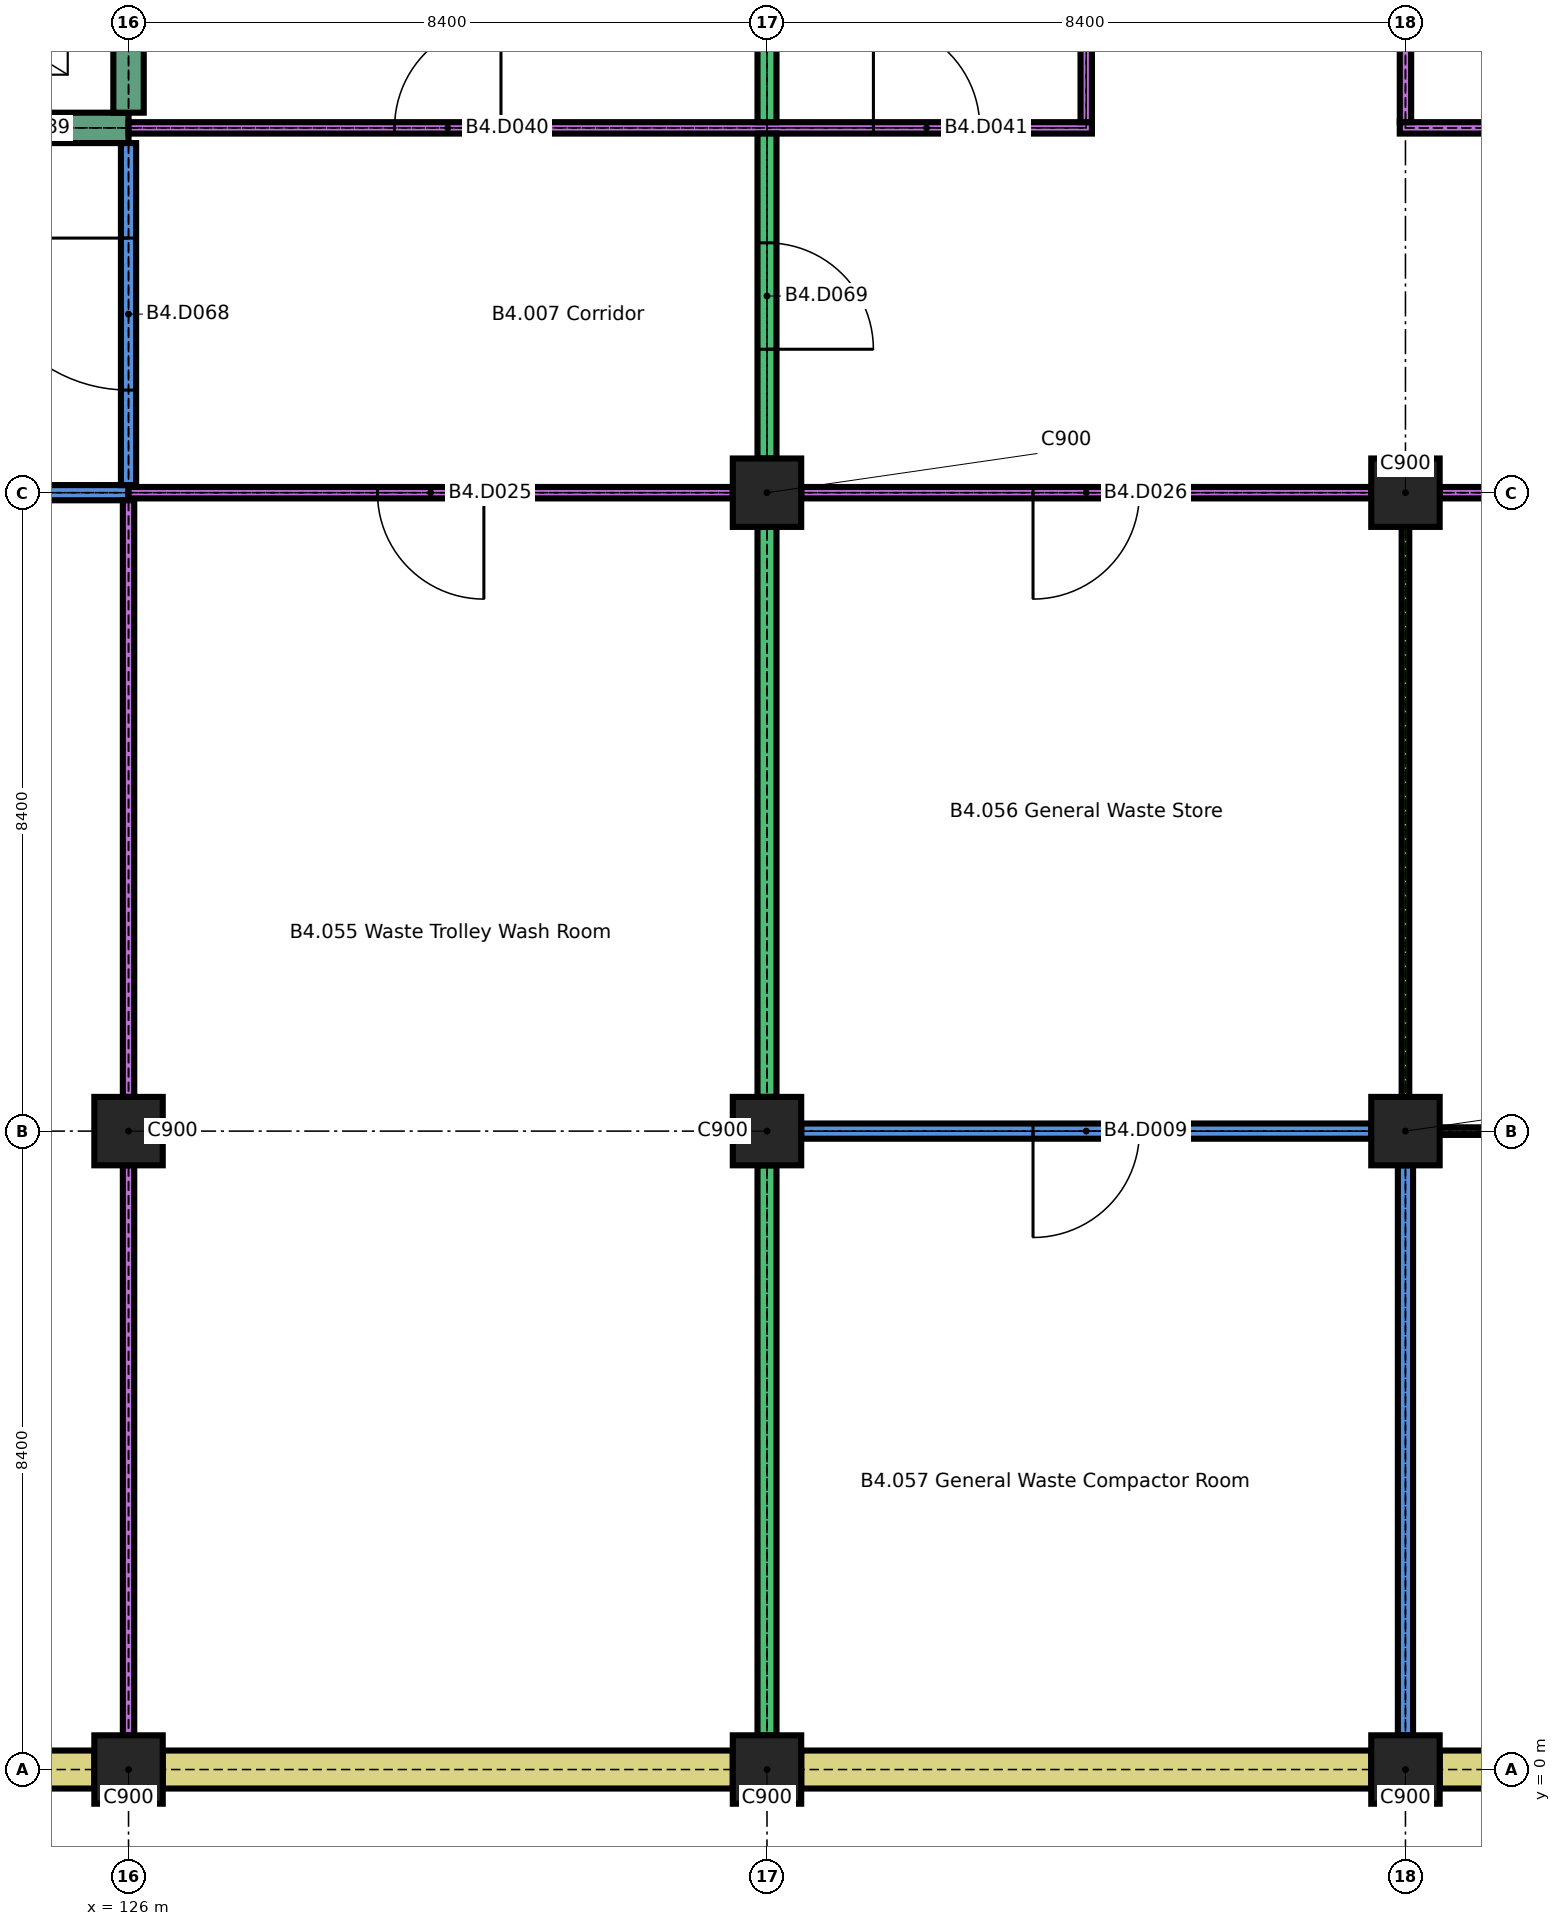
"""IFC4 building model, lengths in metres.
Left out: names, types, materials, properties, quantities, classifications, styles, units other than length and angle.
Written with IfcOpenShell. Run it as: python <this file> out.ifc"""

import sys

from ifc_helpers import new_model, si_unit, direction, frame, frame_2d, origin, origin_2d, place, context, subcontext, project, spatial, rectangle, extrude, element, fill, save


model = new_model("IFC4")
c1 = context("Model", 3, precision=1e-05, world=origin(), true_north=direction((0.0, 1.0)))
c2 = subcontext(c1, "Body", "Model", "MODEL_VIEW")
j1 = project(units=[si_unit("LENGTHUNIT", "METRE"), si_unit("PLANEANGLEUNIT", "RADIAN")], contexts=[c1])
p1 = place(None, origin())
s1 = spatial("IfcSite", under=j1, at=p1, CompositionType="ELEMENT")
p2 = place(p1, origin())
s2 = spatial("IfcBuilding", under=s1, at=p2, CompositionType="ELEMENT")
p3 = place(p2, frame((0.0, 0.0, -15.0)))
s3 = spatial("IfcBuildingStorey", under=s2, at=p3, CompositionType="ELEMENT", Elevation=-15.0)
for number, where, z_axis, x_axis in (
    (1, (126.0, 0.0, 0.0), (0.0, 0.0, 1.0), (1.0, 0.0, 0.0)),
    (2, (134.4, 0.0, 0.0), (0.0, 0.0, 1.0), (1.0, 0.0, 0.0)),
    (3, (142.8, 0.0, 0.0), (0.0, 0.0, 1.0), (1.0, 0.0, 0.0)),
    (4, (126.0, 8.4, 0.0), (0.0, 0.0, 1.0), (1.0, 0.0, 0.0)),
    (5, (134.4, 8.4, 0.0), (0.0, 0.0, 1.0), (1.0, 0.0, 0.0)),
    (6, (142.8, 8.4, 0.0), (0.0, 0.0, 1.0), (1.0, 0.0, 0.0)),
    (7, (134.4, 16.8, 0.0), (0.0, 0.0, 1.0), (1.0, 0.0, 0.0)),
    (8, (142.8, 16.8, 0.0), (0.0, 0.0, 1.0), (1.0, 0.0, 0.0)),
):
    element("IfcColumn", number, at=place(p3, frame(where, z_axis=z_axis, x_axis=x_axis)), inside=s3, PredefinedType="COLUMN", context=c2, shape_type="SweptSolid", body=[
        extrude(rectangle(XDim=0.9, YDim=0.9, at=origin_2d()), origin(), (0.0, 0.0, 1.0), 3.2),
    ])
for number, where, z_axis, x_axis in (
    (9, (118.05, 0.0, 0.0), (0.0, 0.0, 1.0), (1.0, 0.0, 0.0)),
    (10, (126.45, 0.0, 0.0), (0.0, 0.0, 1.0), (1.0, 0.0, 0.0)),
    (11, (134.85, 0.0, 0.0), (0.0, 0.0, 1.0), (1.0, 0.0, 0.0)),
    (12, (143.25, 0.0, 0.0), (0.0, 0.0, 1.0), (1.0, 0.0, 0.0)),
):
    element("IfcWall", number, at=place(p3, frame(where, z_axis=z_axis, x_axis=x_axis)), inside=s3, PredefinedType="SOLIDWALL", context=c2, shape_type="SweptSolid", body=[
        extrude(rectangle(XDim=7.5, YDim=0.5, at=frame_2d((3.75, 0.0))), origin(), (0.0, 0.0, 1.0), 3.2),
    ])
p4 = place(p3, frame((134.85, 8.4, 0.0), z_axis=(0.0, 0.0, 1.0), x_axis=(1.0, 0.0, 0.0)))
e13 = element("IfcWall", 13, at=p4, inside=s3, PredefinedType="PARTITIONING", context=c2, shape_type="SweptSolid", body=[
    extrude(rectangle(XDim=7.5, YDim=0.2, at=frame_2d((3.75, 0.0))), origin(), (0.0, 0.0, 1.0), 3.2),
])
p5 = place(p4, frame((3.05, 0.0, 0.0)))
e14 = element("IfcOpeningElement", 14, at=p5, cuts=e13, PredefinedType="OPENING", context=c2, shape_type="SweptSolid", body=[
    extrude(rectangle(XDim=1.4, YDim=2.1, at=frame_2d((0.7, 1.05))), frame((0.0, 0.11, 0.0), z_axis=(0.0, -1.0, 0.0), x_axis=(1.0, 0.0, 0.0)), (0.0, 0.0, 1.0), 0.22),
])
p6 = place(p3, frame((143.25, 8.4, 0.0), z_axis=(0.0, 0.0, 1.0), x_axis=(1.0, 0.0, 0.0)))
e15 = element("IfcWall", 15, at=p6, inside=s3, PredefinedType="PARTITIONING", context=c2, shape_type="SweptSolid", body=[
    extrude(rectangle(XDim=7.5, YDim=0.1, at=frame_2d((3.75, 0.0))), origin(), (0.0, 0.0, 1.0), 3.2),
])
p7 = place(p6, frame((3.05, 0.0, 0.0)))
e16 = element("IfcOpeningElement", 16, at=p7, cuts=e15, PredefinedType="OPENING", context=c2, shape_type="SweptSolid", body=[
    extrude(rectangle(XDim=1.4, YDim=2.1, at=frame_2d((0.7, 1.05))), frame((0.0, 0.06, 0.0), z_axis=(0.0, -1.0, 0.0), x_axis=(1.0, 0.0, 0.0)), (0.0, 0.0, 1.0), 0.12),
])
p8 = place(p3, frame((109.65, 16.8, 0.0), z_axis=(0.0, 0.0, 1.0), x_axis=(1.0, 0.0, 0.0)))
e17 = element("IfcWall", 17, at=p8, inside=s3, PredefinedType="PARTITIONING", context=c2, shape_type="SweptSolid", body=[
    extrude(rectangle(XDim=16.35, YDim=0.2, at=frame_2d((8.175, 0.0))), origin(), (0.0, 0.0, 1.0), 3.2),
])
p9 = place(p8, frame((3.275, 0.0, 0.0)))
e18 = element("IfcOpeningElement", 18, at=p9, cuts=e17, PredefinedType="OPENING", context=c2, shape_type="SweptSolid", body=[
    extrude(rectangle(XDim=1.4, YDim=2.1, at=frame_2d((0.7, 1.05))), frame((0.0, 0.11, 0.0), z_axis=(0.0, -1.0, 0.0), x_axis=(1.0, 0.0, 0.0)), (0.0, 0.0, 1.0), 0.22),
])
p10 = place(p3, frame((126.0, 16.8, 0.0), z_axis=(0.0, 0.0, 1.0), x_axis=(1.0, 0.0, 0.0)))
e19 = element("IfcWall", 19, at=p10, inside=s3, PredefinedType="PARTITIONING", context=c2, shape_type="SweptSolid", body=[
    extrude(rectangle(XDim=7.95, YDim=0.15, at=frame_2d((3.975, 0.0))), origin(), (0.0, 0.0, 1.0), 3.2),
])
p11 = place(p10, frame((3.275, 0.0, 0.0)))
e20 = element("IfcOpeningElement", 20, at=p11, cuts=e19, PredefinedType="OPENING", context=c2, shape_type="SweptSolid", body=[
    extrude(rectangle(XDim=1.4, YDim=2.1, at=frame_2d((0.7, 1.05))), frame((0.0, 0.085, 0.0), z_axis=(0.0, -1.0, 0.0), x_axis=(1.0, 0.0, 0.0)), (0.0, 0.0, 1.0), 0.17),
])
p12 = place(p3, frame((134.85, 16.8, 0.0), z_axis=(0.0, 0.0, 1.0), x_axis=(1.0, 0.0, 0.0)))
e21 = element("IfcWall", 21, at=p12, inside=s3, PredefinedType="PARTITIONING", context=c2, shape_type="SweptSolid", body=[
    extrude(rectangle(XDim=7.5, YDim=0.15, at=frame_2d((3.75, 0.0))), origin(), (0.0, 0.0, 1.0), 3.2),
])
p13 = place(p12, frame((3.05, 0.0, 0.0)))
e22 = element("IfcOpeningElement", 22, at=p13, cuts=e21, PredefinedType="OPENING", context=c2, shape_type="SweptSolid", body=[
    extrude(rectangle(XDim=1.4, YDim=2.1, at=frame_2d((0.7, 1.05))), frame((0.0, 0.085, 0.0), z_axis=(0.0, -1.0, 0.0), x_axis=(1.0, 0.0, 0.0)), (0.0, 0.0, 1.0), 0.17),
])
p14 = place(p3, frame((143.25, 16.8, 0.0), z_axis=(0.0, 0.0, 1.0), x_axis=(1.0, 0.0, 0.0)))
e23 = element("IfcWall", 23, at=p14, inside=s3, PredefinedType="PARTITIONING", context=c2, shape_type="SweptSolid", body=[
    extrude(rectangle(XDim=7.5, YDim=0.15, at=frame_2d((3.75, 0.0))), origin(), (0.0, 0.0, 1.0), 3.2),
])
p15 = place(p14, frame((3.05, 0.0, 0.0)))
e24 = element("IfcOpeningElement", 24, at=p15, cuts=e23, PredefinedType="OPENING", context=c2, shape_type="SweptSolid", body=[
    extrude(rectangle(XDim=1.4, YDim=2.1, at=frame_2d((0.7, 1.05))), frame((0.0, 0.085, 0.0), z_axis=(0.0, -1.0, 0.0), x_axis=(1.0, 0.0, 0.0)), (0.0, 0.0, 1.0), 0.17),
])
p16 = place(p3, frame((117.8, 21.6, 0.0), z_axis=(0.0, 0.0, 1.0), x_axis=(1.0, 0.0, 0.0)))
e25 = element("IfcWall", 25, at=p16, inside=s3, PredefinedType="SHEAR", context=c2, shape_type="SweptSolid", body=[
    extrude(rectangle(XDim=8.2, YDim=0.4, at=frame_2d((4.1, 0.0))), origin(), (0.0, 0.0, 1.0), 3.2),
])
p17 = place(p16, frame((1.45, 0.0, 0.0)))
e26 = element("IfcOpeningElement", 26, at=p17, cuts=e25, PredefinedType="OPENING", context=c2, shape_type="SweptSolid", body=[
    extrude(rectangle(XDim=1.1, YDim=2.1, at=frame_2d((0.55, 1.05))), frame((0.0, 0.21, 0.0), z_axis=(0.0, -1.0, 0.0), x_axis=(1.0, 0.0, 0.0)), (0.0, 0.0, 1.0), 0.42),
])
p18 = place(p16, frame((5.55, 0.0, 0.0)))
e27 = element("IfcOpeningElement", 27, at=p18, cuts=e25, PredefinedType="OPENING", context=c2, shape_type="SweptSolid", body=[
    extrude(rectangle(XDim=1.1, YDim=2.1, at=frame_2d((0.55, 1.05))), frame((0.0, 0.21, 0.0), z_axis=(0.0, -1.0, 0.0), x_axis=(1.0, 0.0, 0.0)), (0.0, 0.0, 1.0), 0.42),
])
p19 = place(p3, frame((126.0, 21.6, 0.0), z_axis=(0.0, 0.0, 1.0), x_axis=(1.0, 0.0, 0.0)))
e28 = element("IfcWall", 28, at=p19, inside=s3, PredefinedType="PARTITIONING", context=c2, shape_type="SweptSolid", body=[
    extrude(rectangle(XDim=12.675, YDim=0.15, at=frame_2d((6.337, 0.0))), origin(), (0.0, 0.0, 1.0), 3.2),
])
p20 = place(p19, frame((3.5, 0.0, 0.0)))
e29 = element("IfcOpeningElement", 29, at=p20, cuts=e28, PredefinedType="OPENING", context=c2, shape_type="SweptSolid", body=[
    extrude(rectangle(XDim=1.4, YDim=2.1, at=frame_2d((0.7, 1.05))), frame((0.0, 0.085, 0.0), z_axis=(0.0, -1.0, 0.0), x_axis=(1.0, 0.0, 0.0)), (0.0, 0.0, 1.0), 0.17),
])
p21 = place(p19, frame((9.8, 0.0, 0.0)))
e30 = element("IfcOpeningElement", 30, at=p21, cuts=e28, PredefinedType="OPENING", context=c2, shape_type="SweptSolid", body=[
    extrude(rectangle(XDim=1.4, YDim=2.1, at=frame_2d((0.7, 1.05))), frame((0.0, 0.085, 0.0), z_axis=(0.0, -1.0, 0.0), x_axis=(1.0, 0.0, 0.0)), (0.0, 0.0, 1.0), 0.17),
])
p22 = place(p3, frame((142.725, 21.6, 0.0), z_axis=(0.0, 0.0, 1.0), x_axis=(1.0, 0.0, 0.0)))
e31 = element("IfcWall", 31, at=p22, inside=s3, PredefinedType="PARTITIONING", context=c2, shape_type="SweptSolid", body=[
    extrude(rectangle(XDim=16.95, YDim=0.15, at=frame_2d((8.475, 0.0))), origin(), (0.0, 0.0, 1.0), 3.2),
])
p23 = place(p22, frame((7.775, 0.0, 0.0)))
e32 = element("IfcOpeningElement", 32, at=p23, cuts=e31, PredefinedType="OPENING", context=c2, shape_type="SweptSolid", body=[
    extrude(rectangle(XDim=1.4, YDim=2.1, at=frame_2d((0.7, 1.05))), frame((0.0, 0.085, 0.0), z_axis=(0.0, -1.0, 0.0), x_axis=(1.0, 0.0, 0.0)), (0.0, 0.0, 1.0), 0.17),
])
p24 = place(p3, frame((126.0, 0.45, 0.0), z_axis=(0.0, 0.0, 1.0), x_axis=(0.0, 1.0, 0.0)))
e33 = element("IfcWall", 33, at=p24, inside=s3, PredefinedType="PARTITIONING", context=c2, shape_type="SweptSolid", body=[
    extrude(rectangle(XDim=7.5, YDim=0.15, at=frame_2d((3.75, 0.0))), origin(), (0.0, 0.0, 1.0), 3.2),
])
p25 = place(p3, frame((126.0, 8.85, 0.0), z_axis=(0.0, 0.0, 1.0), x_axis=(0.0, 1.0, 0.0)))
e34 = element("IfcWall", 34, at=p25, inside=s3, PredefinedType="PARTITIONING", context=c2, shape_type="SweptSolid", body=[
    extrude(rectangle(XDim=7.85, YDim=0.15, at=frame_2d((3.925, 0.0))), origin(), (0.0, 0.0, 1.0), 3.2),
])
p26 = place(p3, frame((126.0, 16.9, 0.0), z_axis=(0.0, 0.0, 1.0), x_axis=(0.0, 1.0, 0.0)))
e35 = element("IfcWall", 35, at=p26, inside=s3, PredefinedType="PARTITIONING", context=c2, shape_type="SweptSolid", body=[
    extrude(rectangle(XDim=4.5, YDim=0.2, at=frame_2d((2.25, 0.0))), origin(), (0.0, 0.0, 1.0), 3.2),
])
p27 = place(p26, frame((1.25, 0.0, 0.0)))
e36 = element("IfcOpeningElement", 36, at=p27, cuts=e35, PredefinedType="OPENING", context=c2, shape_type="SweptSolid", body=[
    extrude(rectangle(XDim=2.0, YDim=2.4, at=frame_2d((1.0, 1.2))), frame((0.0, 0.11, 0.0), z_axis=(0.0, -1.0, 0.0), x_axis=(1.0, 0.0, 0.0)), (0.0, 0.0, 1.0), 0.22),
])
p28 = place(p3, frame((126.0, 21.8, 0.0), z_axis=(0.0, 0.0, 1.0), x_axis=(0.0, 1.0, 0.0)))
e37 = element("IfcWall", 37, at=p28, inside=s3, PredefinedType="SHEAR", context=c2, shape_type="SweptSolid", body=[
    extrude(rectangle(XDim=3.4, YDim=0.4, at=frame_2d((1.7, 0.0))), origin(), (0.0, 0.0, 1.0), 3.2),
])
for number, where, z_axis, x_axis in (
    (38, (134.4, 0.45, 0.0), (0.0, 0.0, 1.0), (0.0, 1.0, 0.0)),
    (39, (134.4, 8.85, 0.0), (0.0, 0.0, 1.0), (0.0, 1.0, 0.0)),
):
    element("IfcWall", number, at=place(p3, frame(where, z_axis=z_axis, x_axis=x_axis)), inside=s3, PredefinedType="SOLIDWALL", context=c2, shape_type="SweptSolid", body=[
        extrude(rectangle(XDim=7.5, YDim=0.25, at=frame_2d((3.75, 0.0))), origin(), (0.0, 0.0, 1.0), 3.2),
    ])
p29 = place(p3, frame((134.4, 17.25, 0.0), z_axis=(0.0, 0.0, 1.0), x_axis=(0.0, 1.0, 0.0)))
e40 = element("IfcWall", 40, at=p29, inside=s3, PredefinedType="SOLIDWALL", context=c2, shape_type="SweptSolid", body=[
    extrude(rectangle(XDim=4.275, YDim=0.25, at=frame_2d((2.137, 0.0))), origin(), (0.0, 0.0, 1.0), 3.2),
])
p30 = place(p29, frame((1.438, 0.0, 0.0)))
e41 = element("IfcOpeningElement", 41, at=p30, cuts=e40, PredefinedType="OPENING", context=c2, shape_type="SweptSolid", body=[
    extrude(rectangle(XDim=1.4, YDim=2.1, at=frame_2d((0.7, 1.05))), frame((0.0, 0.135, 0.0), z_axis=(0.0, -1.0, 0.0), x_axis=(1.0, 0.0, 0.0)), (0.0, 0.0, 1.0), 0.27),
])
p31 = place(p3, frame((134.4, 21.675, 0.0), z_axis=(0.0, 0.0, 1.0), x_axis=(0.0, 1.0, 0.0)))
e42 = element("IfcWall", 42, at=p31, inside=s3, PredefinedType="SOLIDWALL", context=c2, shape_type="SweptSolid", body=[
    extrude(rectangle(XDim=3.075, YDim=0.25, at=frame_2d((1.538, 0.0))), origin(), (0.0, 0.0, 1.0), 3.2),
])
p32 = place(p3, frame((138.6, 21.675, 0.0), z_axis=(0.0, 0.0, 1.0), x_axis=(0.0, 1.0, 0.0)))
e43 = element("IfcWall", 43, at=p32, inside=s3, PredefinedType="PARTITIONING", context=c2, shape_type="SweptSolid", body=[
    extrude(rectangle(XDim=3.525, YDim=0.15, at=frame_2d((1.762, 0.0))), origin(), (0.0, 0.0, 1.0), 3.2),
])
p33 = place(p3, frame((142.8, 0.45, 0.0), z_axis=(0.0, 0.0, 1.0), x_axis=(0.0, 1.0, 0.0)))
e44 = element("IfcWall", 44, at=p33, inside=s3, PredefinedType="PARTITIONING", context=c2, shape_type="SweptSolid", body=[
    extrude(rectangle(XDim=7.5, YDim=0.2, at=frame_2d((3.75, 0.0))), origin(), (0.0, 0.0, 1.0), 3.2),
])
p34 = place(p3, frame((142.8, 8.85, 0.0), z_axis=(0.0, 0.0, 1.0), x_axis=(0.0, 1.0, 0.0)))
e45 = element("IfcWall", 45, at=p34, inside=s3, PredefinedType="PARTITIONING", context=c2, shape_type="SweptSolid", body=[
    extrude(rectangle(XDim=7.5, YDim=0.1, at=frame_2d((3.75, 0.0))), origin(), (0.0, 0.0, 1.0), 3.2),
])
p35 = place(p3, frame((142.8, 21.675, 0.0), z_axis=(0.0, 0.0, 1.0), x_axis=(0.0, 1.0, 0.0)))
e46 = element("IfcWall", 46, at=p35, inside=s3, PredefinedType="PARTITIONING", context=c2, shape_type="SweptSolid", body=[
    extrude(rectangle(XDim=3.525, YDim=0.15, at=frame_2d((1.762, 0.0))), origin(), (0.0, 0.0, 1.0), 3.2),
])
p36 = place(p5, origin())
e47 = element("IfcDoor", 47, at=p36, inside=s3, OperationType="SINGLE_SWING_LEFT", PredefinedType="DOOR", context=c2, shape_type="SweptSolid", body=[
    extrude(rectangle(XDim=1.4, YDim=2.1, at=frame_2d((0.7, 1.05))), frame((0.0, 0.025, 0.0), z_axis=(0.0, -1.0, 0.0), x_axis=(1.0, 0.0, 0.0)), (0.0, 0.0, 1.0), 0.05),
])
fill(e14, e47)
p37 = place(p11, origin())
e48 = element("IfcDoor", 48, at=p37, inside=s3, OperationType="SINGLE_SWING_RIGHT", PredefinedType="DOOR", context=c2, shape_type="SweptSolid", body=[
    extrude(rectangle(XDim=1.4, YDim=2.1, at=frame_2d((0.7, 1.05))), frame((0.0, 0.025, 0.0), z_axis=(0.0, -1.0, 0.0), x_axis=(1.0, 0.0, 0.0)), (0.0, 0.0, 1.0), 0.05),
])
fill(e20, e48)
p38 = place(p13, origin())
e49 = element("IfcDoor", 49, at=p38, inside=s3, OperationType="SINGLE_SWING_LEFT", PredefinedType="DOOR", context=c2, shape_type="SweptSolid", body=[
    extrude(rectangle(XDim=1.4, YDim=2.1, at=frame_2d((0.7, 1.05))), frame((0.0, 0.025, 0.0), z_axis=(0.0, -1.0, 0.0), x_axis=(1.0, 0.0, 0.0)), (0.0, 0.0, 1.0), 0.05),
])
fill(e22, e49)
p39 = place(p20, origin())
e50 = element("IfcDoor", 50, at=p39, inside=s3, OperationType="SINGLE_SWING_LEFT", PredefinedType="DOOR", context=c2, shape_type="SweptSolid", body=[
    extrude(rectangle(XDim=1.4, YDim=2.1, at=frame_2d((0.7, 1.05))), frame((0.0, 0.025, 0.0), z_axis=(0.0, -1.0, 0.0), x_axis=(1.0, 0.0, 0.0)), (0.0, 0.0, 1.0), 0.05),
])
fill(e29, e50)
p40 = place(p21, origin())
e51 = element("IfcDoor", 51, at=p40, inside=s3, OperationType="SINGLE_SWING_RIGHT", PredefinedType="DOOR", context=c2, shape_type="SweptSolid", body=[
    extrude(rectangle(XDim=1.4, YDim=2.1, at=frame_2d((0.7, 1.05))), frame((0.0, 0.025, 0.0), z_axis=(0.0, -1.0, 0.0), x_axis=(1.0, 0.0, 0.0)), (0.0, 0.0, 1.0), 0.05),
])
fill(e30, e51)
p41 = place(p27, origin())
e52 = element("IfcDoor", 52, at=p41, inside=s3, OperationType="SINGLE_SWING_LEFT", PredefinedType="DOOR", context=c2, shape_type="SweptSolid", body=[
    extrude(rectangle(XDim=2.0, YDim=2.4, at=frame_2d((1.0, 1.2))), frame((0.0, 0.03, 0.0), z_axis=(0.0, -1.0, 0.0), x_axis=(1.0, 0.0, 0.0)), (0.0, 0.0, 1.0), 0.06),
])
fill(e36, e52)
p42 = place(p30, origin())
e53 = element("IfcDoor", 53, at=p42, inside=s3, OperationType="SINGLE_SWING_LEFT", PredefinedType="DOOR", context=c2, shape_type="SweptSolid", body=[
    extrude(rectangle(XDim=1.4, YDim=2.1, at=frame_2d((0.7, 1.05))), frame((0.0, 0.03, 0.0), z_axis=(0.0, -1.0, 0.0), x_axis=(1.0, 0.0, 0.0)), (0.0, 0.0, 1.0), 0.06),
])
fill(e41, e53)
save(model, sys.argv[1])
